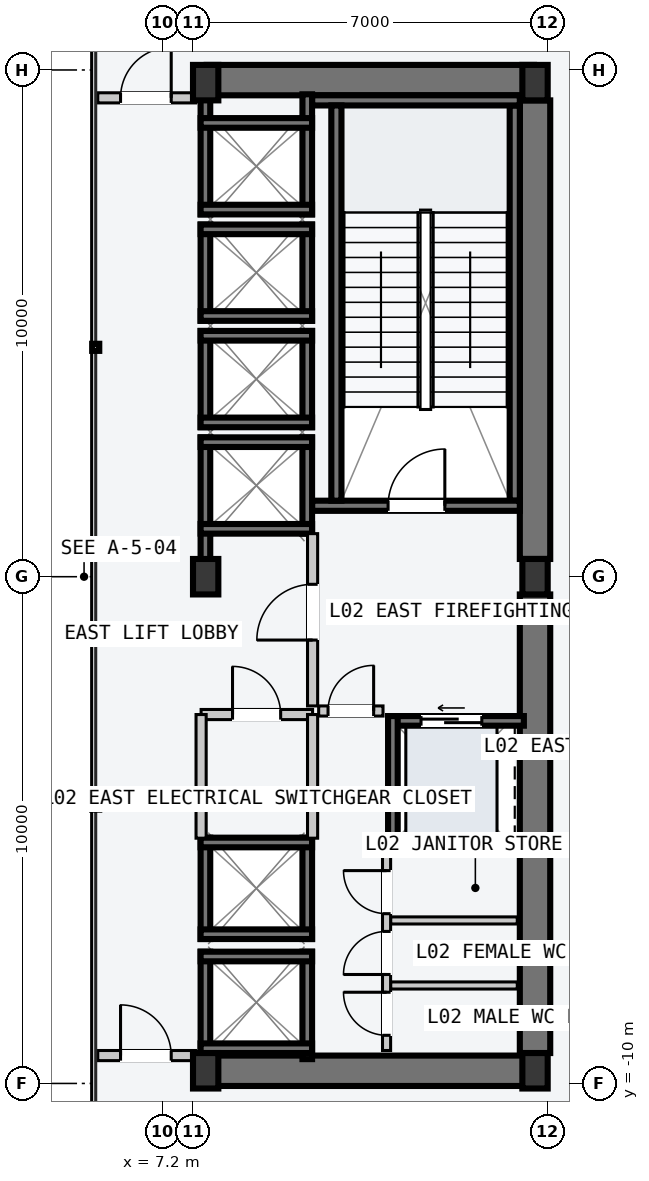
"""IFC4 building model, lengths in metres.
Left out: names, types, materials, properties, quantities, classifications, styles, units other than length and angle.
Written with IfcOpenShell. Run it as: python <this file> out.ifc"""

import sys

from ifc_helpers import new_model, si_unit, direction, frame, frame_2d, origin, origin_2d, place, context, subcontext, project, spatial, rectangle, i_section, extrude, element, fill, save


model = new_model("IFC4")
c1 = context("Model", 3, precision=1e-05, world=origin(), true_north=direction((0.0, 1.0)))
c2 = subcontext(c1, "Body", "Model", "MODEL_VIEW")
j1 = project(units=[si_unit("LENGTHUNIT", "METRE"), si_unit("PLANEANGLEUNIT", "RADIAN")], contexts=[c1])
p1 = place(None, origin())
s1 = spatial("IfcSite", under=j1, at=p1, CompositionType="ELEMENT")
p2 = place(p1, origin())
s2 = spatial("IfcBuilding", under=s1, at=p2, CompositionType="ELEMENT")
p3 = place(p2, frame((0.0, 0.0, 9.6)))
s3 = spatial("IfcBuildingStorey", under=s2, at=p3, CompositionType="ELEMENT", Elevation=9.6)
for number, where, z_axis, x_axis in (
    (1, (8.07, -9.75, -0.22), (0.0, 0.0, 1.0), (1.0, 0.0, 0.0)),
    (2, (8.07, 9.8, -0.22), (0.0, 0.0, 1.0), (1.0, 0.0, 0.0)),
):
    element("IfcWall", number, at=place(p3, frame(where, z_axis=z_axis, x_axis=x_axis)), inside=s3, PredefinedType="SHEAR", context=c2, shape_type="SweptSolid", body=[
        extrude(rectangle(XDim=6.46, YDim=0.6, at=frame_2d((3.23, 0.0))), origin(), (0.0, 0.0, 1.0), 4.8),
    ])
for number, where, z_axis, x_axis in (
    (3, (14.55, -9.4, -0.22), (0.0, 0.0, 1.0), (0.0, 1.0, 0.0)),
    (4, (14.55, 0.35, -0.22), (0.0, 0.0, 1.0), (0.0, 1.0, 0.0)),
):
    element("IfcWall", number, at=place(p3, frame(where, z_axis=z_axis, x_axis=x_axis)), inside=s3, PredefinedType="SHEAR", context=c2, shape_type="SweptSolid", body=[
        extrude(rectangle(XDim=9.05, YDim=0.6, at=frame_2d((4.525, 0.0))), origin(), (0.0, 0.0, 1.0), 4.8),
    ])
p4 = place(p3, frame((14.15, 1.5, -0.22), z_axis=(0.0, 0.0, 1.0), x_axis=(0.0, 1.0, 0.0)))
e5 = element("IfcWall", 5, at=p4, inside=s3, PredefinedType="SOLIDWALL", context=c2, shape_type="SweptSolid", body=[
    extrude(rectangle(XDim=7.8, YDim=0.2, at=frame_2d((3.9, 0.0))), origin(), (0.0, 0.0, 1.0), 4.8),
])
p5 = place(p3, frame((10.15, 1.4, -0.22), z_axis=(0.0, 0.0, 1.0), x_axis=(1.0, 0.0, 0.0)))
e6 = element("IfcWall", 6, at=p5, inside=s3, PredefinedType="SOLIDWALL", context=c2, shape_type="SweptSolid", body=[
    extrude(rectangle(XDim=4.1, YDim=0.2, at=frame_2d((2.05, 0.0))), origin(), (0.0, 0.0, 1.0), 4.8),
])
p6 = place(p5, frame((1.5, 0.0, 0.22)))
e7 = element("IfcOpeningElement", 7, at=p6, cuts=e6, PredefinedType="OPENING", context=c2, shape_type="SweptSolid", body=[
    extrude(rectangle(XDim=1.12, YDim=2.18, at=frame_2d((0.56, 1.09))), frame((0.0, 0.11, 0.0), z_axis=(0.0, -1.0, 0.0), x_axis=(1.0, 0.0, 0.0)), (0.0, 0.0, 1.0), 0.22),
])
p7 = place(p3, frame((10.15, 9.4, -0.22), z_axis=(0.0, 0.0, 1.0), x_axis=(1.0, 0.0, 0.0)))
e8 = element("IfcWall", 8, at=p7, inside=s3, PredefinedType="SOLIDWALL", context=c2, shape_type="SweptSolid", body=[
    extrude(rectangle(XDim=4.1, YDim=0.2, at=frame_2d((2.05, 0.0))), origin(), (0.0, 0.0, 1.0), 4.8),
])
p8 = place(p3, frame((10.63, 1.5, -0.22), z_axis=(0.0, 0.0, 1.0), x_axis=(0.0, 1.0, 0.0)))
e9 = element("IfcWall", 9, at=p8, inside=s3, PredefinedType="SOLIDWALL", context=c2, shape_type="SweptSolid", body=[
    extrude(rectangle(XDim=7.8, YDim=0.2, at=frame_2d((3.9, 0.0))), origin(), (0.0, 0.0, 1.0), 4.8),
])
for number, where, z_axis, x_axis in (
    (10, (8.05, -9.75, 0.0), (0.0, 0.0, 1.0), (1.0, 0.0, 0.0)),
    (11, (8.05, 0.0, 0.0), (0.0, 0.0, 1.0), (1.0, 0.0, 0.0)),
    (12, (8.05, 9.75, 0.0), (0.0, 0.0, 1.0), (1.0, 0.0, 0.0)),
    (13, (14.55, -9.75, 0.0), (0.0, 0.0, 1.0), (1.0, 0.0, 0.0)),
    (14, (14.55, 0.0, 0.0), (0.0, 0.0, 1.0), (1.0, 0.0, 0.0)),
    (15, (14.55, 9.75, 0.0), (0.0, 0.0, 1.0), (1.0, 0.0, 0.0)),
):
    element("IfcColumn", number, at=place(p3, frame(where, z_axis=z_axis, x_axis=x_axis)), inside=s3, PredefinedType="COLUMN", context=c2, shape_type="SweptSolid", body=[
        extrude(i_section(OverallWidth=0.5, OverallDepth=0.7, WebThickness=0.028, FlangeThickness=0.045, at=origin_2d()), origin(), (0.0, 0.0, 1.0), 4.8),
    ])
p9 = place(p3, frame((8.045, 0.21, -0.22), z_axis=(0.0, 0.0, 1.0), x_axis=(0.0, 1.0, 0.0)))
e16 = element("IfcWall", 16, at=p9, inside=s3, PredefinedType="SOLIDWALL", context=c2, shape_type="SweptSolid", body=[
    extrude(rectangle(XDim=2.54, YDim=0.19, at=frame_2d((1.27, 0.0))), origin(), (0.0, 0.0, 1.0), 4.8),
])
p10 = place(p3, frame((10.055, 0.85, -0.22), z_axis=(0.0, 0.0, 1.0), x_axis=(0.0, 1.0, 0.0)))
e17 = element("IfcWall", 17, at=p10, inside=s3, PredefinedType="SOLIDWALL", context=c2, shape_type="SweptSolid", body=[
    extrude(rectangle(XDim=1.9, YDim=0.19, at=frame_2d((0.95, 0.0))), origin(), (0.0, 0.0, 1.0), 4.8),
])
for number, where, z_axis, x_axis in (
    (18, (7.95, 2.655, -0.22), (0.0, 0.0, 1.0), (1.0, 0.0, 0.0)),
    (19, (7.95, 0.945, -0.22), (0.0, 0.0, 1.0), (1.0, 0.0, 0.0)),
):
    element("IfcWall", number, at=place(p3, frame(where, z_axis=z_axis, x_axis=x_axis)), inside=s3, PredefinedType="SOLIDWALL", context=c2, shape_type="SweptSolid", body=[
        extrude(rectangle(XDim=2.2, YDim=0.19, at=frame_2d((1.1, 0.0))), origin(), (0.0, 0.0, 1.0), 4.8),
    ])
for number, where, z_axis, x_axis in (
    (20, (8.045, 2.95, -0.22), (0.0, 0.0, 1.0), (0.0, 1.0, 0.0)),
    (21, (10.055, 2.95, -0.22), (0.0, 0.0, 1.0), (0.0, 1.0, 0.0)),
):
    element("IfcWall", number, at=place(p3, frame(where, z_axis=z_axis, x_axis=x_axis)), inside=s3, PredefinedType="SOLIDWALL", context=c2, shape_type="SweptSolid", body=[
        extrude(rectangle(XDim=1.9, YDim=0.19, at=frame_2d((0.95, 0.0))), origin(), (0.0, 0.0, 1.0), 4.8),
    ])
for number, where, z_axis, x_axis in (
    (22, (7.95, 4.755, -0.22), (0.0, 0.0, 1.0), (1.0, 0.0, 0.0)),
    (23, (7.95, 3.045, -0.22), (0.0, 0.0, 1.0), (1.0, 0.0, 0.0)),
):
    element("IfcWall", number, at=place(p3, frame(where, z_axis=z_axis, x_axis=x_axis)), inside=s3, PredefinedType="SOLIDWALL", context=c2, shape_type="SweptSolid", body=[
        extrude(rectangle(XDim=2.2, YDim=0.19, at=frame_2d((1.1, 0.0))), origin(), (0.0, 0.0, 1.0), 4.8),
    ])
for number, where, z_axis, x_axis in (
    (24, (8.045, 5.05, -0.22), (0.0, 0.0, 1.0), (0.0, 1.0, 0.0)),
    (25, (10.055, 5.05, -0.22), (0.0, 0.0, 1.0), (0.0, 1.0, 0.0)),
):
    element("IfcWall", number, at=place(p3, frame(where, z_axis=z_axis, x_axis=x_axis)), inside=s3, PredefinedType="SOLIDWALL", context=c2, shape_type="SweptSolid", body=[
        extrude(rectangle(XDim=1.9, YDim=0.19, at=frame_2d((0.95, 0.0))), origin(), (0.0, 0.0, 1.0), 4.8),
    ])
for number, where, z_axis, x_axis in (
    (26, (7.95, 6.855, -0.22), (0.0, 0.0, 1.0), (1.0, 0.0, 0.0)),
    (27, (7.95, 5.145, -0.22), (0.0, 0.0, 1.0), (1.0, 0.0, 0.0)),
):
    element("IfcWall", number, at=place(p3, frame(where, z_axis=z_axis, x_axis=x_axis)), inside=s3, PredefinedType="SOLIDWALL", context=c2, shape_type="SweptSolid", body=[
        extrude(rectangle(XDim=2.2, YDim=0.19, at=frame_2d((1.1, 0.0))), origin(), (0.0, 0.0, 1.0), 4.8),
    ])
for number, where, z_axis, x_axis in (
    (28, (8.045, 7.15, -0.22), (0.0, 0.0, 1.0), (0.0, 1.0, 0.0)),
    (29, (10.055, 7.15, -0.22), (0.0, 0.0, 1.0), (0.0, 1.0, 0.0)),
):
    element("IfcWall", number, at=place(p3, frame(where, z_axis=z_axis, x_axis=x_axis)), inside=s3, PredefinedType="SOLIDWALL", context=c2, shape_type="SweptSolid", body=[
        extrude(rectangle(XDim=2.37, YDim=0.19, at=frame_2d((1.185, 0.0))), origin(), (0.0, 0.0, 1.0), 4.8),
    ])
for number, where, z_axis, x_axis in (
    (30, (7.95, 8.955, -0.22), (0.0, 0.0, 1.0), (1.0, 0.0, 0.0)),
    (31, (7.95, 7.245, -0.22), (0.0, 0.0, 1.0), (1.0, 0.0, 0.0)),
):
    element("IfcWall", number, at=place(p3, frame(where, z_axis=z_axis, x_axis=x_axis)), inside=s3, PredefinedType="SOLIDWALL", context=c2, shape_type="SweptSolid", body=[
        extrude(rectangle(XDim=2.2, YDim=0.19, at=frame_2d((1.1, 0.0))), origin(), (0.0, 0.0, 1.0), 4.8),
    ])
for number, where, z_axis, x_axis in (
    (32, (8.045, -9.52, -0.22), (0.0, 0.0, 1.0), (0.0, 1.0, 0.0)),
    (33, (10.055, -9.52, -0.22), (0.0, 0.0, 1.0), (0.0, 1.0, 0.0)),
):
    element("IfcWall", number, at=place(p3, frame(where, z_axis=z_axis, x_axis=x_axis)), inside=s3, PredefinedType="SOLIDWALL", context=c2, shape_type="SweptSolid", body=[
        extrude(rectangle(XDim=2.12, YDim=0.19, at=frame_2d((1.06, 0.0))), origin(), (0.0, 0.0, 1.0), 4.8),
    ])
for number, where, z_axis, x_axis in (
    (34, (7.95, -7.495, -0.22), (0.0, 0.0, 1.0), (1.0, 0.0, 0.0)),
    (35, (7.95, -9.305, -0.22), (0.0, 0.0, 1.0), (1.0, 0.0, 0.0)),
):
    element("IfcWall", number, at=place(p3, frame(where, z_axis=z_axis, x_axis=x_axis)), inside=s3, PredefinedType="SOLIDWALL", context=c2, shape_type="SweptSolid", body=[
        extrude(rectangle(XDim=2.2, YDim=0.19, at=frame_2d((1.1, 0.0))), origin(), (0.0, 0.0, 1.0), 4.8),
    ])
for number, where, z_axis, x_axis in (
    (36, (8.045, -7.15, -0.22), (0.0, 0.0, 1.0), (0.0, 1.0, 0.0)),
    (37, (10.055, -7.15, -0.22), (0.0, 0.0, 1.0), (0.0, 1.0, 0.0)),
):
    element("IfcWall", number, at=place(p3, frame(where, z_axis=z_axis, x_axis=x_axis)), inside=s3, PredefinedType="SOLIDWALL", context=c2, shape_type="SweptSolid", body=[
        extrude(rectangle(XDim=2.0, YDim=0.19, at=frame_2d((1.0, 0.0))), origin(), (0.0, 0.0, 1.0), 4.8),
    ])
for number, where, z_axis, x_axis in (
    (38, (7.95, -5.245, -0.22), (0.0, 0.0, 1.0), (1.0, 0.0, 0.0)),
    (39, (7.95, -7.055, -0.22), (0.0, 0.0, 1.0), (1.0, 0.0, 0.0)),
):
    element("IfcWall", number, at=place(p3, frame(where, z_axis=z_axis, x_axis=x_axis)), inside=s3, PredefinedType="SOLIDWALL", context=c2, shape_type="SweptSolid", body=[
        extrude(rectangle(XDim=2.2, YDim=0.19, at=frame_2d((1.1, 0.0))), origin(), (0.0, 0.0, 1.0), 4.8),
    ])
p11 = place(p3, frame((11.65, -2.845, -0.22), z_axis=(0.0, 0.0, 1.0), x_axis=(1.0, 0.0, 0.0)))
e40 = element("IfcWall", 40, at=p11, inside=s3, PredefinedType="SOLIDWALL", context=c2, shape_type="SweptSolid", body=[
    extrude(rectangle(XDim=2.68, YDim=0.19, at=frame_2d((1.34, 0.0))), origin(), (0.0, 0.0, 1.0), 4.8),
])
p12 = place(p11, frame((0.65, 0.0, 0.22)))
e41 = element("IfcOpeningElement", 41, at=p12, cuts=e40, PredefinedType="OPENING", context=c2, shape_type="SweptSolid", body=[
    extrude(rectangle(XDim=1.2, YDim=2.2, at=frame_2d((0.6, 1.1))), frame((0.0, 0.105, 0.0), z_axis=(0.0, -1.0, 0.0), x_axis=(1.0, 0.0, 0.0)), (0.0, 0.0, 1.0), 0.21),
])
p13 = place(p3, frame((11.65, -5.255, -0.22), z_axis=(0.0, 0.0, 1.0), x_axis=(1.0, 0.0, 0.0)))
e42 = element("IfcWall", 42, at=p13, inside=s3, PredefinedType="SOLIDWALL", context=c2, shape_type="SweptSolid", body=[
    extrude(rectangle(XDim=2.68, YDim=0.19, at=frame_2d((1.34, 0.0))), origin(), (0.0, 0.0, 1.0), 4.8),
])
p14 = place(p3, frame((11.745, -5.35, -0.22), z_axis=(0.0, 0.0, 1.0), x_axis=(0.0, 1.0, 0.0)))
e43 = element("IfcWall", 43, at=p14, inside=s3, PredefinedType="SOLIDWALL", context=c2, shape_type="SweptSolid", body=[
    extrude(rectangle(XDim=2.6, YDim=0.19, at=frame_2d((1.3, 0.0))), origin(), (0.0, 0.0, 1.0), 4.8),
])
p15 = place(p3, frame((10.16, -2.55, 0.0), z_axis=(0.0, 0.0, 1.0), x_axis=(0.0, 1.0, 0.0)))
e44 = element("IfcWall", 44, at=p15, inside=s3, PredefinedType="PARTITIONING", context=c2, shape_type="SweptSolid", body=[
    extrude(rectangle(XDim=3.4, YDim=0.2, at=frame_2d((1.7, 0.0))), origin(), (0.0, 0.0, 1.0), 4.58),
])
p16 = place(p15, frame((1.3, 0.0, 0.0)))
e45 = element("IfcOpeningElement", 45, at=p16, cuts=e44, PredefinedType="OPENING", context=c2, shape_type="SweptSolid", body=[
    extrude(rectangle(XDim=1.1, YDim=2.15, at=frame_2d((0.55, 1.075))), frame((0.0, 0.11, 0.0), z_axis=(0.0, -1.0, 0.0), x_axis=(1.0, 0.0, 0.0)), (0.0, 0.0, 1.0), 0.22),
])
p17 = place(p3, frame((10.28, -2.65, 0.0), z_axis=(0.0, 0.0, 1.0), x_axis=(1.0, 0.0, 0.0)))
e46 = element("IfcWall", 46, at=p17, inside=s3, PredefinedType="PARTITIONING", context=c2, shape_type="SweptSolid", body=[
    extrude(rectangle(XDim=1.27, YDim=0.2, at=frame_2d((0.635, 0.0))), origin(), (0.0, 0.0, 1.0), 4.58),
])
p18 = place(p17, frame((0.185, 0.0, 0.0)))
e47 = element("IfcOpeningElement", 47, at=p18, cuts=e46, PredefinedType="OPENING", context=c2, shape_type="SweptSolid", body=[
    extrude(rectangle(XDim=0.9, YDim=2.15, at=frame_2d((0.45, 1.075))), frame((0.0, 0.11, 0.0), z_axis=(0.0, -1.0, 0.0), x_axis=(1.0, 0.0, 0.0)), (0.0, 0.0, 1.0), 0.22),
])
p19 = place(p3, frame((7.96, -2.72, 0.0), z_axis=(0.0, 0.0, 1.0), x_axis=(1.0, 0.0, 0.0)))
e48 = element("IfcWall", 48, at=p19, inside=s3, PredefinedType="PARTITIONING", context=c2, shape_type="SweptSolid", body=[
    extrude(rectangle(XDim=2.2, YDim=0.2, at=frame_2d((1.1, 0.0))), origin(), (0.0, 0.0, 1.0), 4.58),
])
p20 = place(p19, frame((0.62, 0.0, 0.0)))
e49 = element("IfcOpeningElement", 49, at=p20, cuts=e48, PredefinedType="OPENING", context=c2, shape_type="SweptSolid", body=[
    extrude(rectangle(XDim=0.95, YDim=2.1, at=frame_2d((0.475, 1.05))), frame((0.0, 0.11, 0.0), z_axis=(0.0, -1.0, 0.0), x_axis=(1.0, 0.0, 0.0)), (0.0, 0.0, 1.0), 0.22),
])
for number, where, z_axis, x_axis in (
    (50, (7.96, -5.16, 0.0), (0.0, 0.0, 1.0), (0.0, 1.0, 0.0)),
    (51, (10.16, -5.16, 0.0), (0.0, 0.0, 1.0), (0.0, 1.0, 0.0)),
):
    element("IfcWall", number, at=place(p3, frame(where, z_axis=z_axis, x_axis=x_axis)), inside=s3, PredefinedType="PARTITIONING", context=c2, shape_type="SweptSolid", body=[
        extrude(rectangle(XDim=2.44, YDim=0.2, at=frame_2d((1.22, 0.0))), origin(), (0.0, 0.0, 1.0), 4.58),
    ])
for number, where, z_axis, x_axis in (
    (52, (11.7, -8.067, 0.0), (0.0, 0.0, 1.0), (1.0, 0.0, 0.0)),
    (53, (11.7, -6.783, 0.0), (0.0, 0.0, 1.0), (1.0, 0.0, 0.0)),
):
    element("IfcWall", number, at=place(p3, frame(where, z_axis=z_axis, x_axis=x_axis)), inside=s3, PredefinedType="PARTITIONING", context=c2, shape_type="SweptSolid", body=[
        extrude(rectangle(XDim=2.5, YDim=0.14, at=frame_2d((1.25, 0.0))), origin(), (0.0, 0.0, 1.0), 4.58),
    ])
p21 = place(p3, frame((11.62, -9.35, 0.0), z_axis=(0.0, 0.0, 1.0), x_axis=(0.0, 1.0, 0.0)))
e54 = element("IfcWall", 54, at=p21, inside=s3, PredefinedType="PARTITIONING", context=c2, shape_type="SweptSolid", body=[
    extrude(rectangle(XDim=3.85, YDim=0.16, at=frame_2d((1.925, 0.0))), origin(), (0.0, 0.0, 1.0), 4.58),
])
p22 = place(p21, frame((0.3, 0.0, 0.0)))
e55 = element("IfcOpeningElement", 55, at=p22, cuts=e54, PredefinedType="OPENING", context=c2, shape_type="SweptSolid", body=[
    extrude(rectangle(XDim=0.85, YDim=2.12, at=frame_2d((0.425, 1.06))), frame((0.0, 0.09, 0.0), z_axis=(0.0, -1.0, 0.0), x_axis=(1.0, 0.0, 0.0)), (0.0, 0.0, 1.0), 0.18),
])
p23 = place(p21, frame((1.5, 0.0, 0.0)))
e56 = element("IfcOpeningElement", 56, at=p23, cuts=e54, PredefinedType="OPENING", context=c2, shape_type="SweptSolid", body=[
    extrude(rectangle(XDim=0.85, YDim=2.12, at=frame_2d((0.425, 1.06))), frame((0.0, 0.09, 0.0), z_axis=(0.0, -1.0, 0.0), x_axis=(1.0, 0.0, 0.0)), (0.0, 0.0, 1.0), 0.18),
])
p24 = place(p21, frame((2.7, 0.0, 0.0)))
e57 = element("IfcOpeningElement", 57, at=p24, cuts=e54, PredefinedType="OPENING", context=c2, shape_type="SweptSolid", body=[
    extrude(rectangle(XDim=0.85, YDim=2.12, at=frame_2d((0.425, 1.06))), frame((0.0, 0.09, 0.0), z_axis=(0.0, -1.0, 0.0), x_axis=(1.0, 0.0, 0.0)), (0.0, 0.0, 1.0), 0.18),
])
p25 = place(p3, frame((5.92, -9.45, 0.0), z_axis=(0.0, 0.0, 1.0), x_axis=(1.0, 0.0, 0.0)))
e58 = element("IfcWall", 58, at=p25, inside=s3, PredefinedType="PARTITIONING", context=c2, shape_type="SweptSolid", body=[
    extrude(rectangle(XDim=1.93, YDim=0.2, at=frame_2d((0.965, 0.0))), origin(), (0.0, 0.0, 1.0), 2.63),
])
p26 = place(p25, frame((0.45, 0.0, 0.0)))
e59 = element("IfcOpeningElement", 59, at=p26, cuts=e58, PredefinedType="OPENING", context=c2, shape_type="SweptSolid", body=[
    extrude(rectangle(XDim=1.0, YDim=2.15, at=frame_2d((0.5, 1.075))), frame((0.0, 0.11, 0.0), z_axis=(0.0, -1.0, 0.0), x_axis=(1.0, 0.0, 0.0)), (0.0, 0.0, 1.0), 0.22),
])
p27 = place(p3, frame((5.92, 9.45, 0.0), z_axis=(0.0, 0.0, 1.0), x_axis=(1.0, 0.0, 0.0)))
e60 = element("IfcWall", 60, at=p27, inside=s3, PredefinedType="PARTITIONING", context=c2, shape_type="SweptSolid", body=[
    extrude(rectangle(XDim=1.93, YDim=0.2, at=frame_2d((0.965, 0.0))), origin(), (0.0, 0.0, 1.0), 2.63),
])
p28 = place(p27, frame((0.45, 0.0, 0.0)))
e61 = element("IfcOpeningElement", 61, at=p28, cuts=e60, PredefinedType="OPENING", context=c2, shape_type="SweptSolid", body=[
    extrude(rectangle(XDim=1.0, YDim=2.15, at=frame_2d((0.5, 1.075))), frame((0.0, 0.11, 0.0), z_axis=(0.0, -1.0, 0.0), x_axis=(1.0, 0.0, 0.0)), (0.0, 0.0, 1.0), 0.22),
])
p29 = place(p6, origin())
e62 = element("IfcDoor", 62, at=p29, inside=s3, OperationType="SINGLE_SWING_RIGHT", PredefinedType="DOOR", context=c2, shape_type="SweptSolid", body=[
    extrude(rectangle(XDim=1.12, YDim=2.18, at=frame_2d((0.56, 1.09))), frame((0.0, 0.025, 0.0), z_axis=(0.0, -1.0, 0.0), x_axis=(1.0, 0.0, 0.0)), (0.0, 0.0, 1.0), 0.05),
])
fill(e7, e62)
p30 = place(p12, origin())
e63 = element("IfcDoor", 63, at=p30, inside=s3, OperationType="SLIDING_TO_LEFT", PredefinedType="DOOR", context=c2, shape_type="SweptSolid", body=[
    extrude(rectangle(XDim=1.2, YDim=2.2, at=frame_2d((0.6, 1.1))), frame((0.0, 0.025, 0.0), z_axis=(0.0, -1.0, 0.0), x_axis=(1.0, 0.0, 0.0)), (0.0, 0.0, 1.0), 0.05),
])
fill(e41, e63)
p31 = place(p16, origin())
e64 = element("IfcDoor", 64, at=p31, inside=s3, OperationType="SINGLE_SWING_LEFT", PredefinedType="DOOR", context=c2, shape_type="SweptSolid", body=[
    extrude(rectangle(XDim=1.1, YDim=2.15, at=frame_2d((0.55, 1.075))), frame((0.0, 0.025, 0.0), z_axis=(0.0, -1.0, 0.0), x_axis=(1.0, 0.0, 0.0)), (0.0, 0.0, 1.0), 0.05),
])
fill(e45, e64)
p32 = place(p18, origin())
e65 = element("IfcDoor", 65, at=p32, inside=s3, OperationType="SINGLE_SWING_RIGHT", PredefinedType="DOOR", context=c2, shape_type="SweptSolid", body=[
    extrude(rectangle(XDim=0.9, YDim=2.15, at=frame_2d((0.45, 1.075))), frame((0.0, 0.025, 0.0), z_axis=(0.0, -1.0, 0.0), x_axis=(1.0, 0.0, 0.0)), (0.0, 0.0, 1.0), 0.05),
])
fill(e47, e65)
p33 = place(p20, origin())
e66 = element("IfcDoor", 66, at=p33, inside=s3, OperationType="SINGLE_SWING_LEFT", PredefinedType="DOOR", context=c2, shape_type="SweptSolid", body=[
    extrude(rectangle(XDim=0.95, YDim=2.1, at=frame_2d((0.475, 1.05))), frame((0.0, 0.025, 0.0), z_axis=(0.0, -1.0, 0.0), x_axis=(1.0, 0.0, 0.0)), (0.0, 0.0, 1.0), 0.05),
])
fill(e49, e66)
p34 = place(p22, origin())
e67 = element("IfcDoor", 67, at=p34, inside=s3, OperationType="SINGLE_SWING_RIGHT", PredefinedType="DOOR", context=c2, shape_type="SweptSolid", body=[
    extrude(rectangle(XDim=0.85, YDim=2.12, at=frame_2d((0.425, 1.06))), frame((0.0, 0.025, 0.0), z_axis=(0.0, -1.0, 0.0), x_axis=(1.0, 0.0, 0.0)), (0.0, 0.0, 1.0), 0.05),
])
fill(e55, e67)
p35 = place(p23, origin())
e68 = element("IfcDoor", 68, at=p35, inside=s3, OperationType="SINGLE_SWING_LEFT", PredefinedType="DOOR", context=c2, shape_type="SweptSolid", body=[
    extrude(rectangle(XDim=0.85, YDim=2.12, at=frame_2d((0.425, 1.06))), frame((0.0, 0.025, 0.0), z_axis=(0.0, -1.0, 0.0), x_axis=(1.0, 0.0, 0.0)), (0.0, 0.0, 1.0), 0.05),
])
fill(e56, e68)
p36 = place(p24, origin())
e69 = element("IfcDoor", 69, at=p36, inside=s3, OperationType="SINGLE_SWING_RIGHT", PredefinedType="DOOR", context=c2, shape_type="SweptSolid", body=[
    extrude(rectangle(XDim=0.85, YDim=2.12, at=frame_2d((0.425, 1.06))), frame((0.0, 0.025, 0.0), z_axis=(0.0, -1.0, 0.0), x_axis=(1.0, 0.0, 0.0)), (0.0, 0.0, 1.0), 0.05),
])
fill(e57, e69)
p37 = place(p26, origin())
e70 = element("IfcDoor", 70, at=p37, inside=s3, OperationType="SINGLE_SWING_LEFT", PredefinedType="DOOR", context=c2, shape_type="SweptSolid", body=[
    extrude(rectangle(XDim=1.0, YDim=2.15, at=frame_2d((0.5, 1.075))), frame((0.0, 0.025, 0.0), z_axis=(0.0, -1.0, 0.0), x_axis=(1.0, 0.0, 0.0)), (0.0, 0.0, 1.0), 0.05),
])
fill(e59, e70)
p38 = place(p28, origin())
e71 = element("IfcDoor", 71, at=p38, inside=s3, OperationType="SINGLE_SWING_RIGHT", PredefinedType="DOOR", context=c2, shape_type="SweptSolid", body=[
    extrude(rectangle(XDim=1.0, YDim=2.15, at=frame_2d((0.5, 1.075))), frame((0.0, 0.025, 0.0), z_axis=(0.0, -1.0, 0.0), x_axis=(1.0, 0.0, 0.0)), (0.0, 0.0, 1.0), 0.05),
])
fill(e61, e71)
save(model, sys.argv[1])
